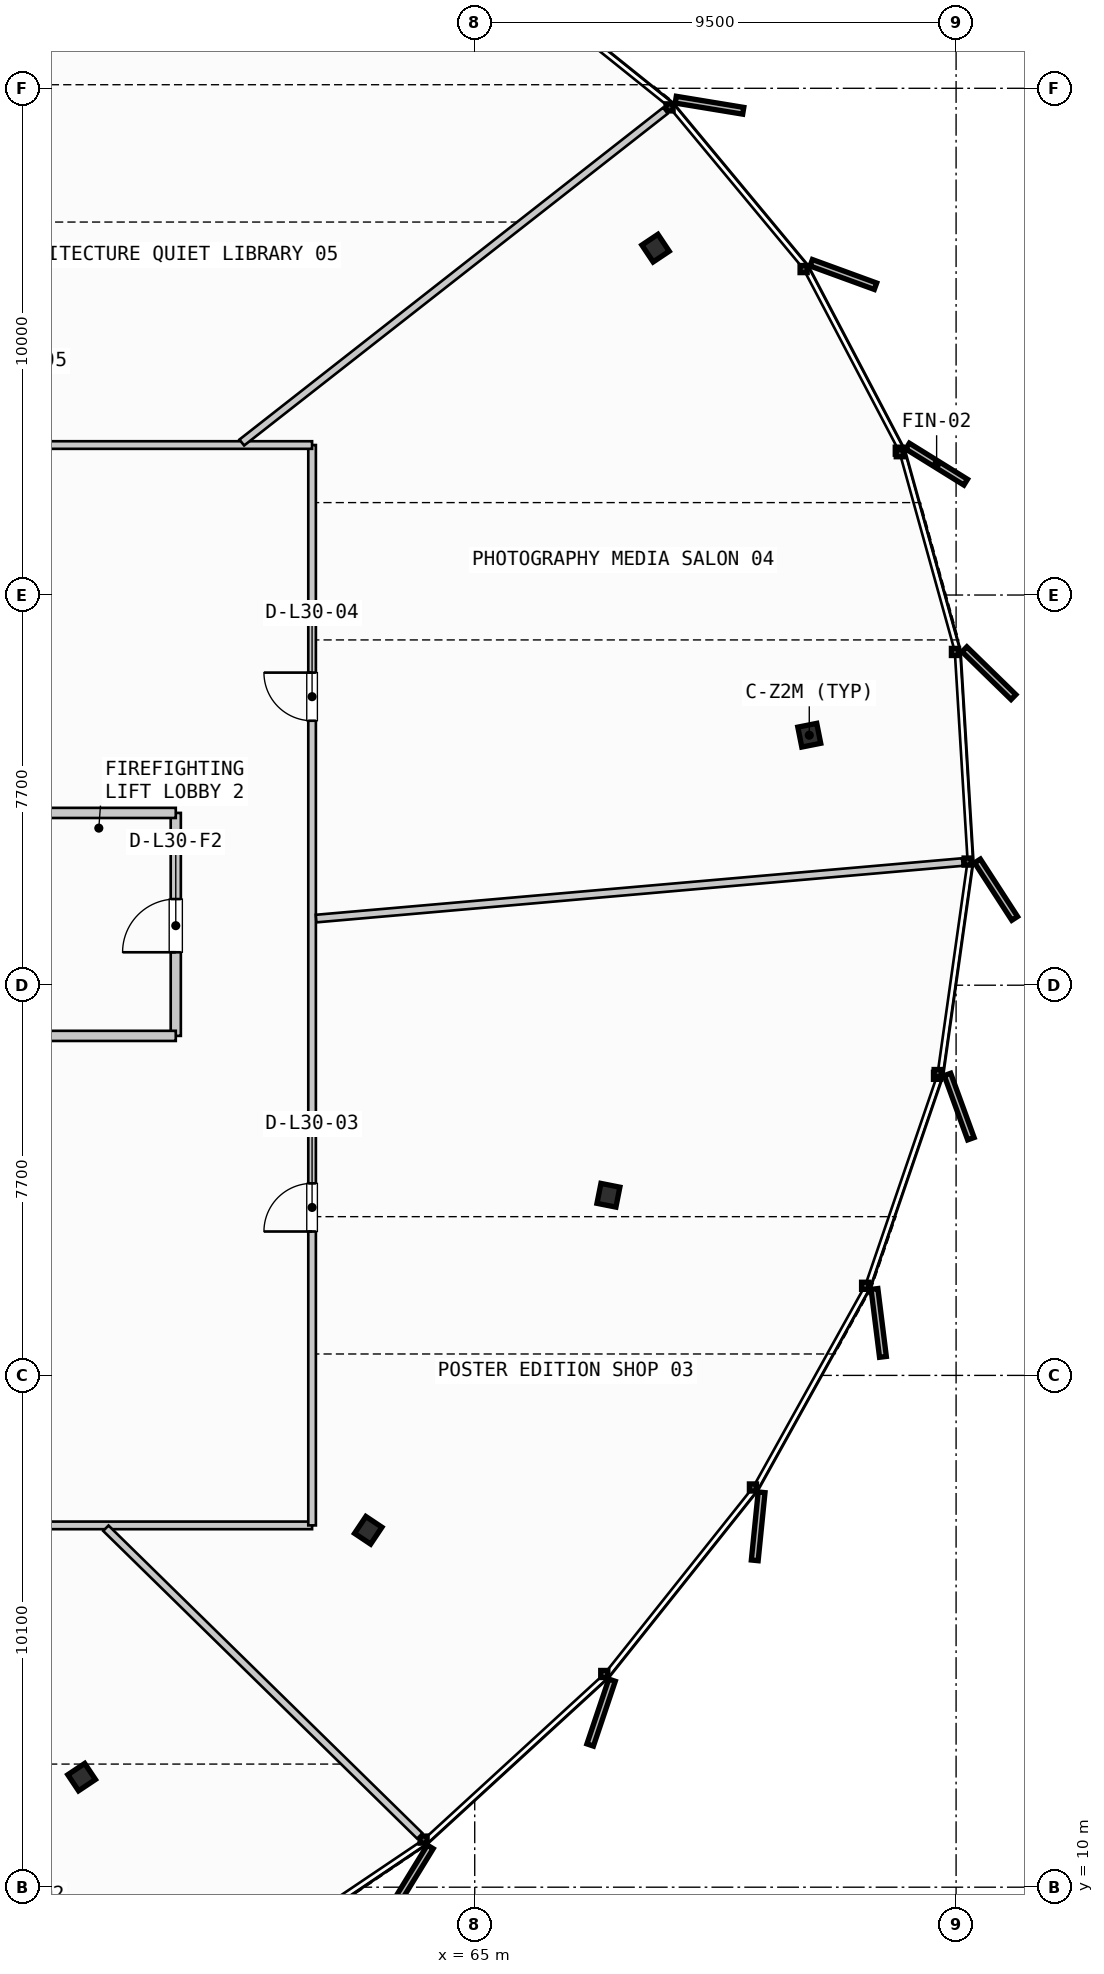
"""IFC4 building model, lengths in metres.
Left out: names, types, materials, properties, quantities, classifications, styles, units other than length and angle.
Written with IfcOpenShell. Run it as: python <this file> out.ifc"""

import sys

from ifc_helpers import new_model, si_unit, direction, frame, frame_2d, origin, origin_2d, place, context, subcontext, project, spatial, rectangle, i_section, extrude, source, transform, mapped, element, fill, save


model = new_model("IFC4")
c1 = context("Model", 3, precision=1e-05, world=origin(), true_north=direction((0.0, 1.0)))
c2 = subcontext(c1, "Body", "Model", "MODEL_VIEW")
j1 = project(units=[si_unit("LENGTHUNIT", "METRE"), si_unit("PLANEANGLEUNIT", "RADIAN")], contexts=[c1])
p1 = place(None, origin())
s1 = spatial("IfcSite", under=j1, at=p1, CompositionType="ELEMENT")
p2 = place(p1, origin())
s2 = spatial("IfcBuilding", under=s1, at=p2, CompositionType="ELEMENT")
p3 = place(p2, frame((0.0, 0.0, 121.6)))
s3 = spatial("IfcBuildingStorey", under=s2, at=p3, CompositionType="ELEMENT", Elevation=121.6)
m1 = source(origin(), c2, "Body", "SweptSolid", [
    extrude(i_section(OverallWidth=0.401, OverallDepth=0.381, WebThickness=0.032, FlangeThickness=0.051, FilletRadius=0.015, at=origin_2d()), origin(), (0.0, 0.0, 1.0), 3.35),
])
for number, where, z_axis, x_axis in (
    (1, (71.603, 32.733, 0.0), (0.0, 0.0, 1.0), (0.981, 0.195, 0.0)),
    (2, (68.569, 42.345, 0.0), (0.0, 0.0, 1.0), (0.831, 0.556, 0.0)),
    (3, (57.242, 12.172, 0.0), (0.0, 0.0, 1.0), (0.556, -0.831, 0.0)),
    (4, (62.899, 17.043, 0.0), (0.0, 0.0, 1.0), (0.831, -0.556, 0.0)),
    (5, (67.639, 23.655, 0.0), (0.0, 0.0, 1.0), (0.981, -0.195, 0.0)),
):
    element("IfcColumn", number, at=place(p3, frame(where, z_axis=z_axis, x_axis=x_axis)), inside=s3, PredefinedType="COLUMN", context=c2, shape_type="MappedRepresentation", body=[
        mapped(m1, transform((0.0, 0.0, 0.0), scale=1.0)),
    ])
p4 = place(p3, frame((59.1, 26.8, 0.0), z_axis=(0.0, 0.0, 1.0), x_axis=(0.0, 1.0, 0.0)))
e6 = element("IfcWall", 6, at=p4, inside=s3, PredefinedType="PARTITIONING", context=c2, shape_type="SweptSolid", body=[
    extrude(rectangle(XDim=4.4, YDim=0.2, at=frame_2d((2.2, 0.0))), origin(), (0.0, 0.0, 1.0), 2.775),
])
p5 = place(p4, frame((1.65, 0.0, 0.0)))
e7 = element("IfcOpeningElement", 7, at=p5, cuts=e6, PredefinedType="OPENING", context=c2, shape_type="SweptSolid", body=[
    extrude(rectangle(XDim=1.05, YDim=2.15, at=frame_2d((0.525, 1.075))), frame((0.0, 0.11, 0.0), z_axis=(0.0, -1.0, 0.0), x_axis=(1.0, 0.0, 0.0)), (0.0, 0.0, 1.0), 0.22),
])
for number, where, z_axis, x_axis in (
    (8, (55.885, 26.8, 0.0), (0.0, 0.0, 1.0), (1.0, 0.0, 0.0)),
    (9, (55.885, 31.2, 0.0), (0.0, 0.0, 1.0), (1.0, 0.0, 0.0)),
):
    element("IfcWall", number, at=place(p3, frame(where, z_axis=z_axis, x_axis=x_axis)), inside=s3, PredefinedType="PARTITIONING", context=c2, shape_type="SweptSolid", body=[
        extrude(rectangle(XDim=3.215, YDim=0.2, at=frame_2d((1.607, 0.0))), origin(), (0.0, 0.0, 1.0), 2.775),
    ])
p6 = place(p3, frame((31.81, 17.14, 0.0), z_axis=(0.0, 0.0, 1.0), x_axis=(1.0, 0.0, 0.0)))
e10 = element("IfcWall", 10, at=p6, inside=s3, PredefinedType="PARTITIONING", context=c2, shape_type="SweptSolid", body=[
    extrude(rectangle(XDim=29.98, YDim=0.15, at=frame_2d((14.99, 0.0))), origin(), (0.0, 0.0, 1.0), 2.775),
])
p7 = place(p6, frame((7.092, 0.0, 0.0)))
e11 = element("IfcOpeningElement", 11, at=p7, cuts=e10, PredefinedType="OPENING", context=c2, shape_type="SweptSolid", body=[
    extrude(rectangle(XDim=0.95, YDim=2.15, at=frame_2d((0.475, 1.075))), frame((0.0, 0.085, 0.0), z_axis=(0.0, -1.0, 0.0), x_axis=(1.0, 0.0, 0.0)), (0.0, 0.0, 1.0), 0.17),
])
p8 = place(p6, frame((19.789, 0.0, 0.0)))
e12 = element("IfcOpeningElement", 12, at=p8, cuts=e10, PredefinedType="OPENING", context=c2, shape_type="SweptSolid", body=[
    extrude(rectangle(XDim=0.95, YDim=2.15, at=frame_2d((0.475, 1.075))), frame((0.0, 0.085, 0.0), z_axis=(0.0, -1.0, 0.0), x_axis=(1.0, 0.0, 0.0)), (0.0, 0.0, 1.0), 0.17),
])
p9 = place(p3, frame((61.79, 17.14, 0.0), z_axis=(0.0, 0.0, 1.0), x_axis=(0.0, 1.0, 0.0)))
e13 = element("IfcWall", 13, at=p9, inside=s3, PredefinedType="PARTITIONING", context=c2, shape_type="SweptSolid", body=[
    extrude(rectangle(XDim=21.32, YDim=0.15, at=frame_2d((10.66, 0.0))), origin(), (0.0, 0.0, 1.0), 2.775),
])
p10 = place(p9, frame((5.8, 0.0, 0.0)))
e14 = element("IfcOpeningElement", 14, at=p10, cuts=e13, PredefinedType="OPENING", context=c2, shape_type="SweptSolid", body=[
    extrude(rectangle(XDim=0.95, YDim=2.15, at=frame_2d((0.475, 1.075))), frame((0.0, 0.085, 0.0), z_axis=(0.0, -1.0, 0.0), x_axis=(1.0, 0.0, 0.0)), (0.0, 0.0, 1.0), 0.17),
])
p11 = place(p9, frame((15.879, 0.0, 0.0)))
e15 = element("IfcOpeningElement", 15, at=p11, cuts=e13, PredefinedType="OPENING", context=c2, shape_type="SweptSolid", body=[
    extrude(rectangle(XDim=0.95, YDim=2.15, at=frame_2d((0.475, 1.075))), frame((0.0, 0.085, 0.0), z_axis=(0.0, -1.0, 0.0), x_axis=(1.0, 0.0, 0.0)), (0.0, 0.0, 1.0), 0.17),
])
p12 = place(p3, frame((61.79, 38.46, 0.0), z_axis=(0.0, 0.0, 1.0), x_axis=(-1.0, 0.0, 0.0)))
e16 = element("IfcWall", 16, at=p12, inside=s3, PredefinedType="PARTITIONING", context=c2, shape_type="SweptSolid", body=[
    extrude(rectangle(XDim=29.98, YDim=0.15, at=frame_2d((14.99, 0.0))), origin(), (0.0, 0.0, 1.0), 2.775),
])
p13 = place(p12, frame((5.278, 0.0, 0.0)))
e17 = element("IfcOpeningElement", 17, at=p13, cuts=e16, PredefinedType="OPENING", context=c2, shape_type="SweptSolid", body=[
    extrude(rectangle(XDim=0.95, YDim=2.15, at=frame_2d((0.475, 1.075))), frame((0.0, 0.085, 0.0), z_axis=(0.0, -1.0, 0.0), x_axis=(1.0, 0.0, 0.0)), (0.0, 0.0, 1.0), 0.17),
])
p14 = place(p12, frame((14.242, 0.0, 0.0)))
e18 = element("IfcOpeningElement", 18, at=p14, cuts=e16, PredefinedType="OPENING", context=c2, shape_type="SweptSolid", body=[
    extrude(rectangle(XDim=0.95, YDim=2.15, at=frame_2d((0.475, 1.075))), frame((0.0, 0.085, 0.0), z_axis=(0.0, -1.0, 0.0), x_axis=(1.0, 0.0, 0.0)), (0.0, 0.0, 1.0), 0.17),
])
p15 = place(p12, frame((22.117, 0.0, 0.0)))
e19 = element("IfcOpeningElement", 19, at=p15, cuts=e16, PredefinedType="OPENING", context=c2, shape_type="SweptSolid", body=[
    extrude(rectangle(XDim=0.95, YDim=2.15, at=frame_2d((0.475, 1.075))), frame((0.0, 0.085, 0.0), z_axis=(0.0, -1.0, 0.0), x_axis=(1.0, 0.0, 0.0)), (0.0, 0.0, 1.0), 0.17),
])
p16 = place(p3, frame((57.72, 17.084, 0.0), z_axis=(0.0, 0.0, 1.0), x_axis=(0.714233098237, -0.699907909215, 0.0)))
e20 = element("IfcWall", 20, at=p16, inside=s3, PredefinedType="PARTITIONING", context=c2, shape_type="SweptSolid", body=[
    extrude(rectangle(XDim=8.675, YDim=0.15, at=frame_2d((4.337, 0.0))), origin(), (0.0, 0.0, 1.0), 2.775),
])
p17 = place(p3, frame((61.87, 29.115, 0.0), z_axis=(0.0, 0.0, 1.0), x_axis=(0.996195228394, 0.087149681153, 0.0)))
e21 = element("IfcWall", 21, at=p17, inside=s3, PredefinedType="PARTITIONING", context=c2, shape_type="SweptSolid", body=[
    extrude(rectangle(XDim=12.802, YDim=0.15, at=frame_2d((6.401, 0.0))), origin(), (0.0, 0.0, 1.0), 2.775),
])
p18 = place(p3, frame((60.403, 38.509, 0.0), z_axis=(0.0, 0.0, 1.0), x_axis=(0.787184712213, 0.616717300599, 0.0)))
e22 = element("IfcWall", 22, at=p18, inside=s3, PredefinedType="PARTITIONING", context=c2, shape_type="SweptSolid", body=[
    extrude(rectangle(XDim=10.62, YDim=0.15, at=frame_2d((5.31, 0.0))), origin(), (0.0, 0.0, 1.0), 2.775),
])
p19 = place(p3, frame((51.594, 38.533, 0.0), z_axis=(0.0, 0.0, 1.0), x_axis=(0.409859427718, 0.912148699232, 0.0)))
e23 = element("IfcWall", 23, at=p19, inside=s3, PredefinedType="PARTITIONING", context=c2, shape_type="SweptSolid", body=[
    extrude(rectangle(XDim=13.825, YDim=0.15, at=frame_2d((6.913, 0.0))), origin(), (0.0, 0.0, 1.0), 2.775),
])
m2 = source(origin(), c2, "Body", "SweptSolid", [
    extrude(rectangle(XDim=1.05, YDim=2.15, at=frame_2d((0.525, 1.075))), frame((0.0, 0.025, 0.0), z_axis=(0.0, -1.0, 0.0), x_axis=(1.0, 0.0, 0.0)), (0.0, 0.0, 1.0), 0.05),
])
p20 = place(p5, origin())
e24 = element("IfcDoor", 24, at=p20, inside=s3, OperationType="SINGLE_SWING_LEFT", PredefinedType="DOOR", context=c2, shape_type="MappedRepresentation", body=[
    mapped(m2, transform((0.0, 0.0, 0.0), scale=1.0)),
])
fill(e7, e24)
m3 = source(origin(), c2, "Body", "SweptSolid", [
    extrude(rectangle(XDim=0.95, YDim=2.15, at=frame_2d((0.475, 1.075))), frame((0.0, 0.025, 0.0), z_axis=(0.0, -1.0, 0.0), x_axis=(1.0, 0.0, 0.0)), (0.0, 0.0, 1.0), 0.05),
])
p21 = place(p10, origin())
e25 = element("IfcDoor", 25, at=p21, inside=s3, OperationType="SINGLE_SWING_LEFT", PredefinedType="DOOR", context=c2, shape_type="MappedRepresentation", body=[
    mapped(m3, transform((0.0, 0.0, 0.0), scale=1.0)),
])
fill(e14, e25)
p22 = place(p11, origin())
e26 = element("IfcDoor", 26, at=p22, inside=s3, OperationType="SINGLE_SWING_RIGHT", PredefinedType="DOOR", context=c2, shape_type="MappedRepresentation", body=[
    mapped(m3, transform((0.0, 0.0, 0.0), scale=1.0)),
])
fill(e15, e26)
save(model, sys.argv[1])
